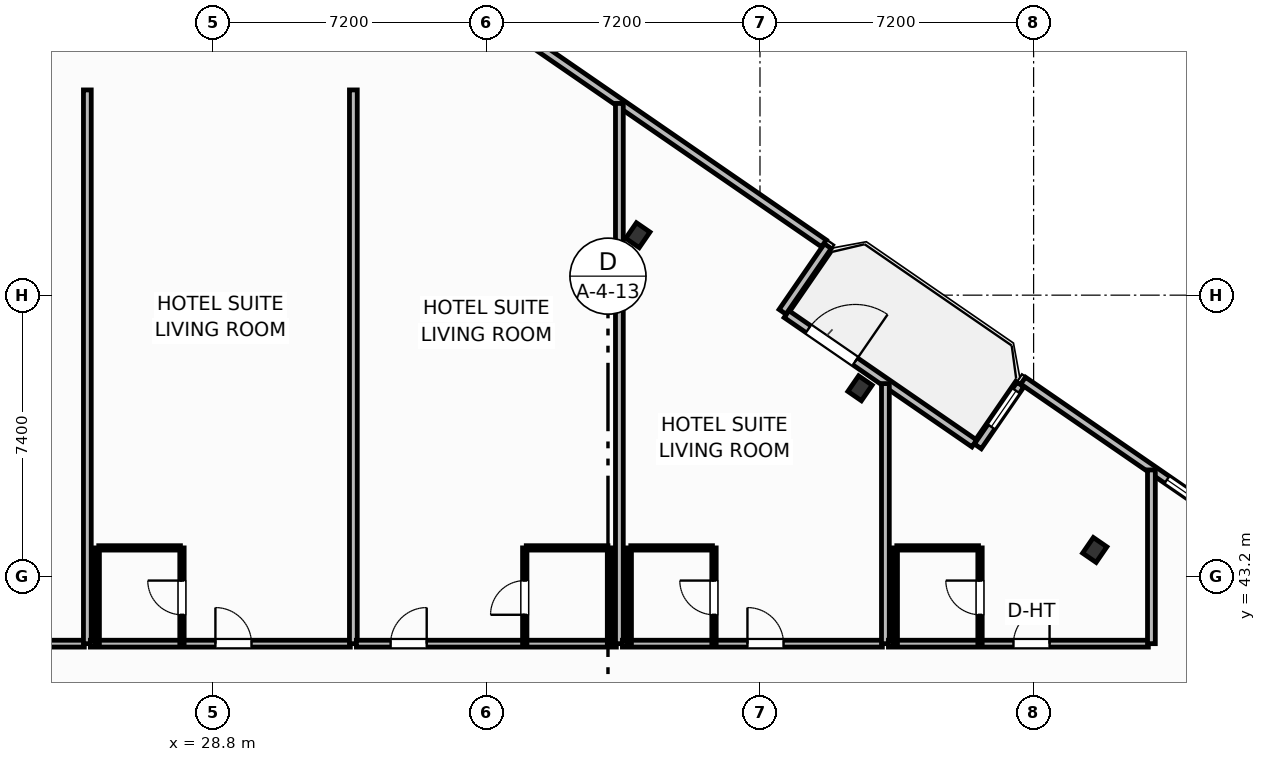
"""IFC4 building model, lengths in metres.
Left out: names, types, materials, properties, quantities, classifications, styles, units other than length and angle.
Written with IfcOpenShell. Run it as: python <this file> out.ifc"""

import sys

from ifc_helpers import new_model, si_unit, direction, frame, frame_2d, origin, origin_2d, place, context, subcontext, project, spatial, rectangle, i_section, extrude, element, fill, save


model = new_model("IFC4")
c1 = context("Model", 3, precision=1e-05, world=origin(), true_north=direction((0.0, 1.0)))
c2 = subcontext(c1, "Body", "Model", "MODEL_VIEW")
j1 = project(units=[si_unit("LENGTHUNIT", "METRE"), si_unit("PLANEANGLEUNIT", "RADIAN")], contexts=[c1])
p1 = place(None, origin())
s1 = spatial("IfcSite", under=j1, at=p1, CompositionType="ELEMENT")
p2 = place(p1, origin())
s2 = spatial("IfcBuilding", under=s1, at=p2, CompositionType="ELEMENT")
p3 = place(p2, frame((0.0, 0.0, 27.0)))
s3 = spatial("IfcBuildingStorey", under=s2, at=p3, CompositionType="ELEMENT", Elevation=27.0)
for number, where, z_axis, x_axis in (
    (1, (52.009, 43.896, -0.25), (0.0, 0.0, 1.0), (0.824, -0.567, 0.0)),
    (2, (45.833, 48.15, -0.25), (0.0, 0.0, 1.0), (0.824, -0.567, 0.0)),
    (3, (39.985, 52.177, -0.25), (0.0, 0.0, 1.0), (0.824, -0.567, 0.0)),
):
    element("IfcColumn", number, at=place(p3, frame(where, z_axis=z_axis, x_axis=x_axis)), inside=s3, PredefinedType="COLUMN", context=c2, shape_type="SweptSolid", body=[
        extrude(i_section(OverallWidth=0.432, OverallDepth=0.498, WebThickness=0.056, FlangeThickness=0.089, FilletRadius=0.025, at=origin_2d()), origin(), (0.0, 0.0, 1.0), 3.95),
    ])
p4 = place(p3, frame((43.898, 50.102, 0.0), z_axis=(0.0, 0.0, 1.0), x_axis=(0.823534636215, -0.567265989598, 0.0)))
e4 = element("IfcWall", 4, at=p4, inside=s3, PredefinedType="SOLIDWALL", context=c2, shape_type="SweptSolid", body=[
    extrude(rectangle(XDim=6.0, YDim=0.22, at=frame_2d((3.0, 0.0))), origin(), (0.0, 0.0, 1.0), 2.73),
])
p5 = place(p4, frame((0.696, 0.0, 0.0)))
e5 = element("IfcOpeningElement", 5, at=p5, cuts=e4, PredefinedType="OPENING", context=c2, shape_type="SweptSolid", body=[
    extrude(rectangle(XDim=1.5, YDim=2.25, at=frame_2d((0.75, 1.125))), frame((0.0, 0.12, 0.0), z_axis=(0.0, -1.0, 0.0), x_axis=(1.0, 0.0, 0.0)), (0.0, 0.0, 1.0), 0.24),
])
p6 = place(p3, frame((56.741, 43.793, 0.0), z_axis=(0.0, 0.0, 1.0), x_axis=(-0.823530942962, 0.56727135128, 0.0)))
e6 = element("IfcWall", 6, at=p6, inside=s3, PredefinedType="SOLIDWALL", context=c2, shape_type="SweptSolid", body=[
    extrude(rectangle(XDim=8.035, YDim=0.22, at=frame_2d((4.018, 0.0))), origin(), (0.0, 0.0, 1.0), 2.73),
])
p7 = place(p6, frame((1.788, 0.0, 0.8)))
e7 = element("IfcOpeningElement", 7, at=p7, cuts=e6, PredefinedType="OPENING", context=c2, shape_type="SweptSolid", body=[
    extrude(rectangle(XDim=1.65, YDim=1.65, at=frame_2d((0.825, 0.825))), frame((0.0, 0.12, 0.0), z_axis=(0.0, -1.0, 0.0), x_axis=(1.0, 0.0, 0.0)), (0.0, 0.0, 1.0), 0.24),
])
p8 = place(p3, frame((50.053, 48.248, 0.0), z_axis=(0.0, 0.0, 1.0), x_axis=(-0.567273565974, -0.823529417415, 0.0)))
e8 = element("IfcWall", 8, at=p8, inside=s3, PredefinedType="SOLIDWALL", context=c2, shape_type="SweptSolid", body=[
    extrude(rectangle(XDim=1.975, YDim=0.22, at=frame_2d((0.988, 0.0))), origin(), (0.0, 0.0, 1.0), 2.73),
])
p9 = place(p8, frame((0.2, 0.0, 0.8)))
e9 = element("IfcOpeningElement", 9, at=p9, cuts=e8, PredefinedType="OPENING", context=c2, shape_type="SweptSolid", body=[
    extrude(rectangle(XDim=1.15, YDim=1.4, at=frame_2d((0.575, 0.7))), frame((0.0, 0.12, 0.0), z_axis=(0.0, -1.0, 0.0), x_axis=(1.0, 0.0, 0.0)), (0.0, 0.0, 1.0), 0.24),
])
p10 = place(p3, frame((43.794, 50.161, 0.0), z_axis=(0.0, 0.0, 1.0), x_axis=(0.567352541689, 0.823475010816, 0.0)))
e10 = element("IfcWall", 10, at=p10, inside=s3, PredefinedType="SOLIDWALL", context=c2, shape_type="SweptSolid", body=[
    extrude(rectangle(XDim=2.1, YDim=0.22, at=frame_2d((1.05, 0.0))), origin(), (0.0, 0.0, 1.0), 2.73),
])
p11 = place(p3, frame((44.882, 51.962, 0.0), z_axis=(0.0, 0.0, 1.0), x_axis=(-0.823534427573, 0.567266292497, 0.0)))
e11 = element("IfcWall", 11, at=p11, inside=s3, PredefinedType="SOLIDWALL", context=c2, shape_type="SweptSolid", body=[
    extrude(rectangle(XDim=23.147, YDim=0.22, at=frame_2d((11.574, 0.0))), origin(), (0.0, 0.0, 1.0), 2.73),
])
p12 = place(p11, frame((10.749, 0.0, 0.8)))
e12 = element("IfcOpeningElement", 12, at=p12, cuts=e11, PredefinedType="OPENING", context=c2, shape_type="SweptSolid", body=[
    extrude(rectangle(XDim=1.65, YDim=1.65, at=frame_2d((0.825, 0.825))), frame((0.0, 0.12, 0.0), z_axis=(0.0, -1.0, 0.0), x_axis=(1.0, 0.0, 0.0)), (0.0, 0.0, 1.0), 0.24),
])
p13 = place(p3, frame((2.921, 41.43, 0.0), z_axis=(0.0, 0.0, 1.0), x_axis=(1.0, 0.0, 0.0)))
e13 = element("IfcWall", 13, at=p13, inside=s3, PredefinedType="PARTITIONING", context=c2, shape_type="SweptSolid", body=[
    extrude(rectangle(XDim=22.499, YDim=0.18, at=frame_2d((11.25, 0.0))), origin(), (0.0, 0.0, 1.0), 3.45),
])
p14 = place(p13, frame((18.35, 0.0, 0.0)))
e14 = element("IfcOpeningElement", 14, at=p14, cuts=e13, PredefinedType="OPENING", context=c2, shape_type="SweptSolid", body=[
    extrude(rectangle(XDim=0.95, YDim=2.15, at=frame_2d((0.475, 1.075))), frame((0.0, 0.1, 0.0), z_axis=(0.0, -1.0, 0.0), x_axis=(1.0, 0.0, 0.0)), (0.0, 0.0, 1.0), 0.2),
])
p15 = place(p3, frame((25.5, 41.43, 0.0), z_axis=(0.0, 0.0, 1.0), x_axis=(0.0, 1.0, 0.0)))
e15 = element("IfcWall", 15, at=p15, inside=s3, PredefinedType="PARTITIONING", context=c2, shape_type="SweptSolid", body=[
    extrude(rectangle(XDim=14.57, YDim=0.205, at=frame_2d((7.285, 0.0))), origin(), (0.0, 0.0, 1.0), 3.45),
])
p16 = place(p3, frame((25.58, 41.43, 0.0), z_axis=(0.0, 0.0, 1.0), x_axis=(1.0, 0.0, 0.0)))
e16 = element("IfcWall", 16, at=p16, inside=s3, PredefinedType="PARTITIONING", context=c2, shape_type="SweptSolid", body=[
    extrude(rectangle(XDim=6.84, YDim=0.18, at=frame_2d((3.42, 0.0))), origin(), (0.0, 0.0, 1.0), 3.45),
])
p17 = place(p16, frame((3.29, 0.0, 0.0)))
e17 = element("IfcOpeningElement", 17, at=p17, cuts=e16, PredefinedType="OPENING", context=c2, shape_type="SweptSolid", body=[
    extrude(rectangle(XDim=0.95, YDim=2.15, at=frame_2d((0.475, 1.075))), frame((0.0, 0.1, 0.0), z_axis=(0.0, -1.0, 0.0), x_axis=(1.0, 0.0, 0.0)), (0.0, 0.0, 1.0), 0.2),
])
p18 = place(p3, frame((25.8, 43.95, 0.0), z_axis=(0.0, 0.0, 1.0), x_axis=(1.0, 0.0, 0.0)))
e18 = element("IfcWall", 18, at=p18, inside=s3, PredefinedType="PARTITIONING", context=c2, shape_type="SweptSolid", body=[
    extrude(rectangle(XDim=2.15, YDim=0.115, at=frame_2d((1.075, 0.0))), origin(), (0.0, 0.0, 1.0), 3.45),
])
p19 = place(p3, frame((27.99, 41.43, 0.0), z_axis=(0.0, 0.0, 1.0), x_axis=(0.0, 1.0, 0.0)))
e19 = element("IfcWall", 19, at=p19, inside=s3, PredefinedType="PARTITIONING", context=c2, shape_type="SweptSolid", body=[
    extrude(rectangle(XDim=2.52, YDim=0.115, at=frame_2d((1.26, 0.0))), origin(), (0.0, 0.0, 1.0), 3.45),
])
p20 = place(p19, frame((0.76, 0.0, 0.0)))
e20 = element("IfcOpeningElement", 20, at=p20, cuts=e19, PredefinedType="OPENING", context=c2, shape_type="SweptSolid", body=[
    extrude(rectangle(XDim=0.9, YDim=2.05, at=frame_2d((0.45, 1.025))), frame((0.0, 0.067, 0.0), z_axis=(0.0, -1.0, 0.0), x_axis=(1.0, 0.0, 0.0)), (0.0, 0.0, 1.0), 0.135),
])
p21 = place(p3, frame((25.76, 41.43, 0.0), z_axis=(0.0, 0.0, 1.0), x_axis=(0.0, 1.0, 0.0)))
e21 = element("IfcWall", 21, at=p21, inside=s3, PredefinedType="PARTITIONING", context=c2, shape_type="SweptSolid", body=[
    extrude(rectangle(XDim=2.52, YDim=0.115, at=frame_2d((1.26, 0.0))), origin(), (0.0, 0.0, 1.0), 3.45),
])
p22 = place(p3, frame((32.5, 41.43, 0.0), z_axis=(0.0, 0.0, 1.0), x_axis=(0.0, 1.0, 0.0)))
e22 = element("IfcWall", 22, at=p22, inside=s3, PredefinedType="PARTITIONING", context=c2, shape_type="SweptSolid", body=[
    extrude(rectangle(XDim=14.57, YDim=0.205, at=frame_2d((7.285, 0.0))), origin(), (0.0, 0.0, 1.0), 3.45),
])
p23 = place(p3, frame((32.58, 41.43, 0.0), z_axis=(0.0, 0.0, 1.0), x_axis=(1.0, 0.0, 0.0)))
e23 = element("IfcWall", 23, at=p23, inside=s3, PredefinedType="PARTITIONING", context=c2, shape_type="SweptSolid", body=[
    extrude(rectangle(XDim=6.84, YDim=0.18, at=frame_2d((3.42, 0.0))), origin(), (0.0, 0.0, 1.0), 3.45),
])
p24 = place(p23, frame((0.9, 0.0, 0.0)))
e24 = element("IfcOpeningElement", 24, at=p24, cuts=e23, PredefinedType="OPENING", context=c2, shape_type="SweptSolid", body=[
    extrude(rectangle(XDim=0.95, YDim=2.15, at=frame_2d((0.475, 1.075))), frame((0.0, 0.1, 0.0), z_axis=(0.0, -1.0, 0.0), x_axis=(1.0, 0.0, 0.0)), (0.0, 0.0, 1.0), 0.2),
])
p25 = place(p3, frame((37.05, 43.95, 0.0), z_axis=(0.0, 0.0, 1.0), x_axis=(1.0, 0.0, 0.0)))
e25 = element("IfcWall", 25, at=p25, inside=s3, PredefinedType="PARTITIONING", context=c2, shape_type="SweptSolid", body=[
    extrude(rectangle(XDim=2.15, YDim=0.115, at=frame_2d((1.075, 0.0))), origin(), (0.0, 0.0, 1.0), 3.45),
])
p26 = place(p3, frame((37.01, 41.43, 0.0), z_axis=(0.0, 0.0, 1.0), x_axis=(0.0, 1.0, 0.0)))
e26 = element("IfcWall", 26, at=p26, inside=s3, PredefinedType="PARTITIONING", context=c2, shape_type="SweptSolid", body=[
    extrude(rectangle(XDim=2.52, YDim=0.115, at=frame_2d((1.26, 0.0))), origin(), (0.0, 0.0, 1.0), 3.45),
])
p27 = place(p26, frame((0.76, 0.0, 0.0)))
e27 = element("IfcOpeningElement", 27, at=p27, cuts=e26, PredefinedType="OPENING", context=c2, shape_type="SweptSolid", body=[
    extrude(rectangle(XDim=0.9, YDim=2.05, at=frame_2d((0.45, 1.025))), frame((0.0, 0.067, 0.0), z_axis=(0.0, -1.0, 0.0), x_axis=(1.0, 0.0, 0.0)), (0.0, 0.0, 1.0), 0.135),
])
p28 = place(p3, frame((39.24, 41.43, 0.0), z_axis=(0.0, 0.0, 1.0), x_axis=(0.0, 1.0, 0.0)))
e28 = element("IfcWall", 28, at=p28, inside=s3, PredefinedType="PARTITIONING", context=c2, shape_type="SweptSolid", body=[
    extrude(rectangle(XDim=2.52, YDim=0.115, at=frame_2d((1.26, 0.0))), origin(), (0.0, 0.0, 1.0), 3.45),
])
p29 = place(p3, frame((39.5, 41.43, 0.0), z_axis=(0.0, 0.0, 1.0), x_axis=(0.0, 1.0, 0.0)))
e29 = element("IfcWall", 29, at=p29, inside=s3, PredefinedType="PARTITIONING", context=c2, shape_type="SweptSolid", body=[
    extrude(rectangle(XDim=14.215, YDim=0.205, at=frame_2d((7.107, 0.0))), origin(), (0.0, 0.0, 1.0), 3.45),
])
p30 = place(p3, frame((39.58, 41.43, 0.0), z_axis=(0.0, 0.0, 1.0), x_axis=(1.0, 0.0, 0.0)))
e30 = element("IfcWall", 30, at=p30, inside=s3, PredefinedType="PARTITIONING", context=c2, shape_type="SweptSolid", body=[
    extrude(rectangle(XDim=6.84, YDim=0.18, at=frame_2d((3.42, 0.0))), origin(), (0.0, 0.0, 1.0), 3.45),
])
p31 = place(p30, frame((3.29, 0.0, 0.0)))
e31 = element("IfcOpeningElement", 31, at=p31, cuts=e30, PredefinedType="OPENING", context=c2, shape_type="SweptSolid", body=[
    extrude(rectangle(XDim=0.95, YDim=2.15, at=frame_2d((0.475, 1.075))), frame((0.0, 0.1, 0.0), z_axis=(0.0, -1.0, 0.0), x_axis=(1.0, 0.0, 0.0)), (0.0, 0.0, 1.0), 0.2),
])
p32 = place(p3, frame((39.8, 43.95, 0.0), z_axis=(0.0, 0.0, 1.0), x_axis=(1.0, 0.0, 0.0)))
e32 = element("IfcWall", 32, at=p32, inside=s3, PredefinedType="PARTITIONING", context=c2, shape_type="SweptSolid", body=[
    extrude(rectangle(XDim=2.15, YDim=0.115, at=frame_2d((1.075, 0.0))), origin(), (0.0, 0.0, 1.0), 3.45),
])
p33 = place(p3, frame((41.99, 41.43, 0.0), z_axis=(0.0, 0.0, 1.0), x_axis=(0.0, 1.0, 0.0)))
e33 = element("IfcWall", 33, at=p33, inside=s3, PredefinedType="PARTITIONING", context=c2, shape_type="SweptSolid", body=[
    extrude(rectangle(XDim=2.52, YDim=0.115, at=frame_2d((1.26, 0.0))), origin(), (0.0, 0.0, 1.0), 3.45),
])
p34 = place(p33, frame((0.76, 0.0, 0.0)))
e34 = element("IfcOpeningElement", 34, at=p34, cuts=e33, PredefinedType="OPENING", context=c2, shape_type="SweptSolid", body=[
    extrude(rectangle(XDim=0.9, YDim=2.05, at=frame_2d((0.45, 1.025))), frame((0.0, 0.067, 0.0), z_axis=(0.0, -1.0, 0.0), x_axis=(1.0, 0.0, 0.0)), (0.0, 0.0, 1.0), 0.135),
])
p35 = place(p3, frame((39.76, 41.43, 0.0), z_axis=(0.0, 0.0, 1.0), x_axis=(0.0, 1.0, 0.0)))
e35 = element("IfcWall", 35, at=p35, inside=s3, PredefinedType="PARTITIONING", context=c2, shape_type="SweptSolid", body=[
    extrude(rectangle(XDim=2.52, YDim=0.115, at=frame_2d((1.26, 0.0))), origin(), (0.0, 0.0, 1.0), 3.45),
])
p36 = place(p3, frame((46.5, 41.43, 0.0), z_axis=(0.0, 0.0, 1.0), x_axis=(0.0, 1.0, 0.0)))
e36 = element("IfcWall", 36, at=p36, inside=s3, PredefinedType="PARTITIONING", context=c2, shape_type="SweptSolid", body=[
    extrude(rectangle(XDim=6.843, YDim=0.205, at=frame_2d((3.421, 0.0))), origin(), (0.0, 0.0, 1.0), 2.58),
])
p37 = place(p3, frame((46.58, 41.43, 0.0), z_axis=(0.0, 0.0, 1.0), x_axis=(1.0, 0.0, 0.0)))
e37 = element("IfcWall", 37, at=p37, inside=s3, PredefinedType="PARTITIONING", context=c2, shape_type="SweptSolid", body=[
    extrude(rectangle(XDim=6.84, YDim=0.18, at=frame_2d((3.42, 0.0))), origin(), (0.0, 0.0, 1.0), 3.45),
])
p38 = place(p37, frame((3.29, 0.0, 0.0)))
e38 = element("IfcOpeningElement", 38, at=p38, cuts=e37, PredefinedType="OPENING", context=c2, shape_type="SweptSolid", body=[
    extrude(rectangle(XDim=0.95, YDim=2.15, at=frame_2d((0.475, 1.075))), frame((0.0, 0.1, 0.0), z_axis=(0.0, -1.0, 0.0), x_axis=(1.0, 0.0, 0.0)), (0.0, 0.0, 1.0), 0.2),
])
p39 = place(p3, frame((46.8, 43.95, 0.0), z_axis=(0.0, 0.0, 1.0), x_axis=(1.0, 0.0, 0.0)))
e39 = element("IfcWall", 39, at=p39, inside=s3, PredefinedType="PARTITIONING", context=c2, shape_type="SweptSolid", body=[
    extrude(rectangle(XDim=2.15, YDim=0.115, at=frame_2d((1.075, 0.0))), origin(), (0.0, 0.0, 1.0), 3.45),
])
p40 = place(p3, frame((48.99, 41.43, 0.0), z_axis=(0.0, 0.0, 1.0), x_axis=(0.0, 1.0, 0.0)))
e40 = element("IfcWall", 40, at=p40, inside=s3, PredefinedType="PARTITIONING", context=c2, shape_type="SweptSolid", body=[
    extrude(rectangle(XDim=2.52, YDim=0.115, at=frame_2d((1.26, 0.0))), origin(), (0.0, 0.0, 1.0), 3.45),
])
p41 = place(p40, frame((0.76, 0.0, 0.0)))
e41 = element("IfcOpeningElement", 41, at=p41, cuts=e40, PredefinedType="OPENING", context=c2, shape_type="SweptSolid", body=[
    extrude(rectangle(XDim=0.9, YDim=2.05, at=frame_2d((0.45, 1.025))), frame((0.0, 0.067, 0.0), z_axis=(0.0, -1.0, 0.0), x_axis=(1.0, 0.0, 0.0)), (0.0, 0.0, 1.0), 0.135),
])
p42 = place(p3, frame((46.76, 41.43, 0.0), z_axis=(0.0, 0.0, 1.0), x_axis=(0.0, 1.0, 0.0)))
e42 = element("IfcWall", 42, at=p42, inside=s3, PredefinedType="PARTITIONING", context=c2, shape_type="SweptSolid", body=[
    extrude(rectangle(XDim=2.52, YDim=0.115, at=frame_2d((1.26, 0.0))), origin(), (0.0, 0.0, 1.0), 2.58),
])
p43 = place(p3, frame((53.5, 41.43, 0.0), z_axis=(0.0, 0.0, 1.0), x_axis=(0.0, 1.0, 0.0)))
e43 = element("IfcWall", 43, at=p43, inside=s3, PredefinedType="PARTITIONING", context=c2, shape_type="SweptSolid", body=[
    extrude(rectangle(XDim=4.571, YDim=0.205, at=frame_2d((2.286, 0.0))), origin(), (0.0, 0.0, 1.0), 3.45),
])
p44 = place(p5, origin())
e44 = element("IfcDoor", 44, at=p44, inside=s3, OperationType="SINGLE_SWING_RIGHT", PredefinedType="DOOR", context=c2, shape_type="SweptSolid", body=[
    extrude(rectangle(XDim=1.5, YDim=2.25, at=frame_2d((0.75, 1.125))), frame((0.0, 0.025, 0.0), z_axis=(0.0, -1.0, 0.0), x_axis=(1.0, 0.0, 0.0)), (0.0, 0.0, 1.0), 0.05),
])
fill(e5, e44)
p45 = place(p7, origin())
e45 = element("IfcWindow", 45, at=p45, inside=s3, PartitioningType="SINGLE_PANEL", PredefinedType="WINDOW", context=c2, shape_type="SweptSolid", body=[
    extrude(rectangle(XDim=1.65, YDim=1.65, at=frame_2d((0.825, 0.825))), frame((0.0, 0.03, 0.0), z_axis=(0.0, -1.0, 0.0), x_axis=(1.0, 0.0, 0.0)), (0.0, 0.0, 1.0), 0.06),
])
fill(e7, e45)
p46 = place(p17, origin())
e46 = element("IfcDoor", 46, at=p46, inside=s3, OperationType="SINGLE_SWING_LEFT", PredefinedType="DOOR", context=c2, shape_type="SweptSolid", body=[
    extrude(rectangle(XDim=0.95, YDim=2.15, at=frame_2d((0.475, 1.075))), frame((0.0, 0.025, 0.0), z_axis=(0.0, -1.0, 0.0), x_axis=(1.0, 0.0, 0.0)), (0.0, 0.0, 1.0), 0.05),
])
fill(e17, e46)
p47 = place(p20, origin())
e47 = element("IfcDoor", 47, at=p47, inside=s3, OperationType="SINGLE_SWING_RIGHT", PredefinedType="DOOR", context=c2, shape_type="SweptSolid", body=[
    extrude(rectangle(XDim=0.9, YDim=2.05, at=frame_2d((0.45, 1.025))), frame((0.0, 0.025, 0.0), z_axis=(0.0, -1.0, 0.0), x_axis=(1.0, 0.0, 0.0)), (0.0, 0.0, 1.0), 0.05),
])
fill(e20, e47)
p48 = place(p24, origin())
e48 = element("IfcDoor", 48, at=p48, inside=s3, OperationType="SINGLE_SWING_RIGHT", PredefinedType="DOOR", context=c2, shape_type="SweptSolid", body=[
    extrude(rectangle(XDim=0.95, YDim=2.15, at=frame_2d((0.475, 1.075))), frame((0.0, 0.025, 0.0), z_axis=(0.0, -1.0, 0.0), x_axis=(1.0, 0.0, 0.0)), (0.0, 0.0, 1.0), 0.05),
])
fill(e24, e48)
p49 = place(p27, origin())
e49 = element("IfcDoor", 49, at=p49, inside=s3, OperationType="SINGLE_SWING_LEFT", PredefinedType="DOOR", context=c2, shape_type="SweptSolid", body=[
    extrude(rectangle(XDim=0.9, YDim=2.05, at=frame_2d((0.45, 1.025))), frame((0.0, 0.025, 0.0), z_axis=(0.0, -1.0, 0.0), x_axis=(1.0, 0.0, 0.0)), (0.0, 0.0, 1.0), 0.05),
])
fill(e27, e49)
p50 = place(p31, origin())
e50 = element("IfcDoor", 50, at=p50, inside=s3, OperationType="SINGLE_SWING_LEFT", PredefinedType="DOOR", context=c2, shape_type="SweptSolid", body=[
    extrude(rectangle(XDim=0.95, YDim=2.15, at=frame_2d((0.475, 1.075))), frame((0.0, 0.025, 0.0), z_axis=(0.0, -1.0, 0.0), x_axis=(1.0, 0.0, 0.0)), (0.0, 0.0, 1.0), 0.05),
])
fill(e31, e50)
p51 = place(p34, origin())
e51 = element("IfcDoor", 51, at=p51, inside=s3, OperationType="SINGLE_SWING_RIGHT", PredefinedType="DOOR", context=c2, shape_type="SweptSolid", body=[
    extrude(rectangle(XDim=0.9, YDim=2.05, at=frame_2d((0.45, 1.025))), frame((0.0, 0.025, 0.0), z_axis=(0.0, -1.0, 0.0), x_axis=(1.0, 0.0, 0.0)), (0.0, 0.0, 1.0), 0.05),
])
fill(e34, e51)
p52 = place(p38, origin())
e52 = element("IfcDoor", 52, at=p52, inside=s3, OperationType="SINGLE_SWING_RIGHT", PredefinedType="DOOR", context=c2, shape_type="SweptSolid", body=[
    extrude(rectangle(XDim=0.95, YDim=2.15, at=frame_2d((0.475, 1.075))), frame((0.0, 0.025, 0.0), z_axis=(0.0, -1.0, 0.0), x_axis=(1.0, 0.0, 0.0)), (0.0, 0.0, 1.0), 0.05),
])
fill(e38, e52)
p53 = place(p41, origin())
e53 = element("IfcDoor", 53, at=p53, inside=s3, OperationType="SINGLE_SWING_RIGHT", PredefinedType="DOOR", context=c2, shape_type="SweptSolid", body=[
    extrude(rectangle(XDim=0.9, YDim=2.05, at=frame_2d((0.45, 1.025))), frame((0.0, 0.025, 0.0), z_axis=(0.0, -1.0, 0.0), x_axis=(1.0, 0.0, 0.0)), (0.0, 0.0, 1.0), 0.05),
])
fill(e41, e53)
p54 = place(p9, origin())
e54 = element("IfcWindow", 54, at=p54, inside=s3, PartitioningType="SINGLE_PANEL", PredefinedType="WINDOW", context=c2, shape_type="SweptSolid", body=[
    extrude(rectangle(XDim=1.15, YDim=1.4, at=frame_2d((0.575, 0.7))), frame((0.0, 0.03, 0.0), z_axis=(0.0, -1.0, 0.0), x_axis=(1.0, 0.0, 0.0)), (0.0, 0.0, 1.0), 0.06),
])
fill(e9, e54)
save(model, sys.argv[1])
